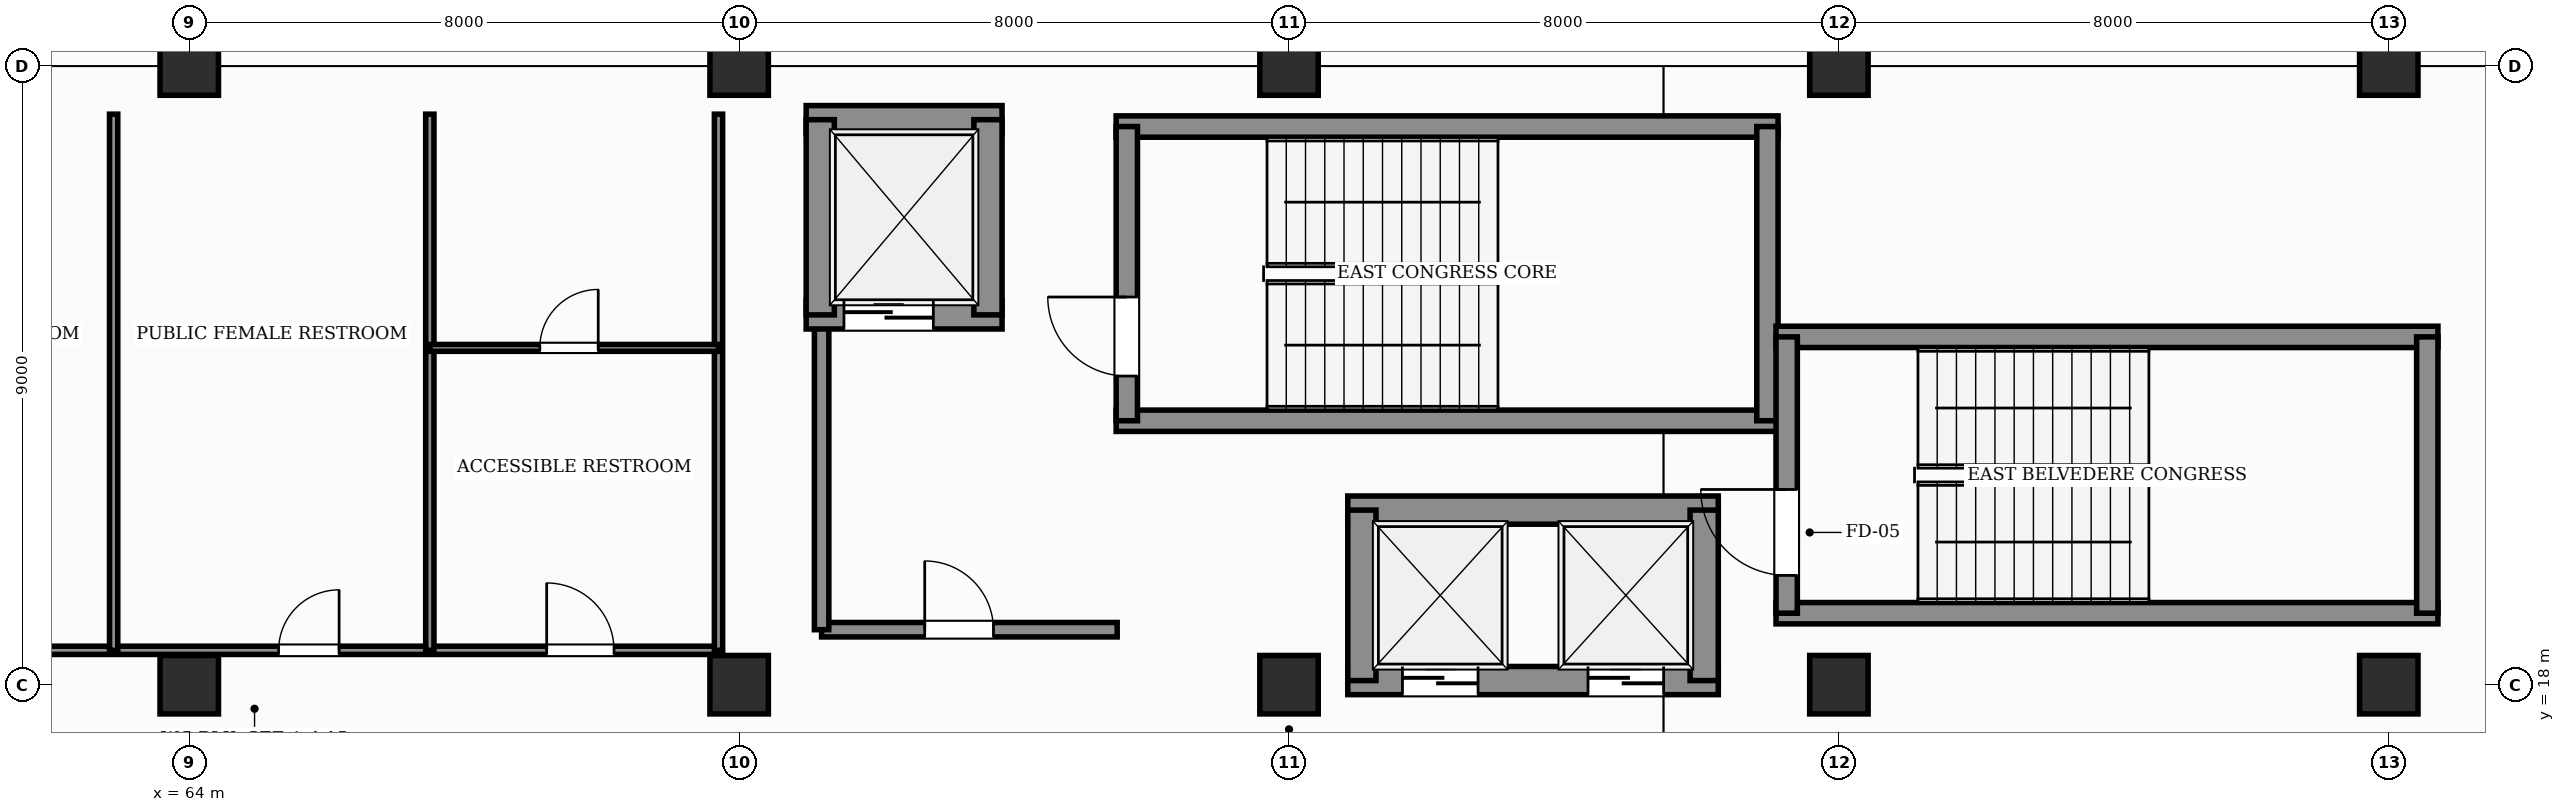
"""IFC4 building model, lengths in metres.
Left out: names, types, materials, properties, quantities, classifications, styles, units other than length and angle.
Written with IfcOpenShell. Run it as: python <this file> out.ifc"""

import sys

from ifc_helpers import new_model, si_unit, direction, frame, frame_2d, origin, origin_2d, place, context, subcontext, project, spatial, rectangle, extrude, element, fill, save


model = new_model("IFC4")
c1 = context("Model", 3, precision=1e-05, world=origin(), true_north=direction((0.0, 1.0)))
c2 = subcontext(c1, "Body", "Model", "MODEL_VIEW")
j1 = project(units=[si_unit("LENGTHUNIT", "METRE"), si_unit("PLANEANGLEUNIT", "RADIAN")], contexts=[c1])
p1 = place(None, origin())
s1 = spatial("IfcSite", under=j1, at=p1, CompositionType="ELEMENT")
p2 = place(p1, origin())
s2 = spatial("IfcBuilding", under=s1, at=p2, CompositionType="ELEMENT")
p3 = place(p2, frame((0.0, 0.0, -4.8)))
s3 = spatial("IfcBuildingStorey", under=s2, at=p3, CompositionType="ELEMENT", Elevation=-4.8)
for number, where, z_axis, x_axis in (
    (1, (64.0, 18.0, 0.0), (0.0, 0.0, 1.0), (1.0, 0.0, 0.0)),
    (2, (64.0, 27.0, 0.0), (0.0, 0.0, 1.0), (1.0, 0.0, 0.0)),
    (3, (72.0, 18.0, 0.0), (0.0, 0.0, 1.0), (1.0, 0.0, 0.0)),
    (4, (72.0, 27.0, 0.0), (0.0, 0.0, 1.0), (1.0, 0.0, 0.0)),
    (5, (80.0, 18.0, 0.0), (0.0, 0.0, 1.0), (1.0, 0.0, 0.0)),
    (6, (80.0, 27.0, 0.0), (0.0, 0.0, 1.0), (1.0, 0.0, 0.0)),
    (7, (88.0, 18.0, 0.0), (0.0, 0.0, 1.0), (1.0, 0.0, 0.0)),
    (8, (88.0, 27.0, 0.0), (0.0, 0.0, 1.0), (1.0, 0.0, 0.0)),
    (9, (96.0, 18.0, 0.0), (0.0, 0.0, 1.0), (1.0, 0.0, 0.0)),
    (10, (96.0, 27.0, 0.0), (0.0, 0.0, 1.0), (1.0, 0.0, 0.0)),
):
    element("IfcColumn", number, at=place(p3, frame(where, z_axis=z_axis, x_axis=x_axis)), inside=s3, PredefinedType="COLUMN", context=c2, shape_type="SweptSolid", body=[
        extrude(rectangle(XDim=0.85, YDim=0.85, at=origin_2d()), origin(), (0.0, 0.0, 1.0), 4.8),
    ])
for number, where, z_axis, x_axis in (
    (11, (77.485, 21.84, 0.0), (0.0, 0.0, 1.0), (1.0, 0.0, 0.0)),
    (12, (77.485, 26.12, 0.0), (0.0, 0.0, 1.0), (1.0, 0.0, 0.0)),
):
    element("IfcWall", number, at=place(p3, frame(where, z_axis=z_axis, x_axis=x_axis)), inside=s3, PredefinedType="SHEAR", context=c2, shape_type="SweptSolid", body=[
        extrude(rectangle(XDim=9.63, YDim=0.31, at=frame_2d((4.815, 0.0))), origin(), (0.0, 0.0, 1.0), 4.8),
    ])
p4 = place(p3, frame((77.64, 21.84, 0.0), z_axis=(0.0, 0.0, 1.0), x_axis=(0.0, 1.0, 0.0)))
e13 = element("IfcWall", 13, at=p4, inside=s3, PredefinedType="SHEAR", context=c2, shape_type="SweptSolid", body=[
    extrude(rectangle(XDim=4.28, YDim=0.31, at=frame_2d((2.14, 0.0))), origin(), (0.0, 0.0, 1.0), 4.8),
])
p5 = place(p4, frame((0.65, 0.0, 0.0)))
e14 = element("IfcOpeningElement", 14, at=p5, cuts=e13, PredefinedType="OPENING", context=c2, shape_type="SweptSolid", body=[
    extrude(rectangle(XDim=1.15, YDim=2.2, at=frame_2d((0.575, 1.1))), frame((0.0, 0.165, 0.0), z_axis=(0.0, -1.0, 0.0), x_axis=(1.0, 0.0, 0.0)), (0.0, 0.0, 1.0), 0.33),
])
p6 = place(p3, frame((86.96, 21.84, 0.0), z_axis=(0.0, 0.0, 1.0), x_axis=(0.0, 1.0, 0.0)))
e15 = element("IfcWall", 15, at=p6, inside=s3, PredefinedType="SHEAR", context=c2, shape_type="SweptSolid", body=[
    extrude(rectangle(XDim=4.28, YDim=0.31, at=frame_2d((2.14, 0.0))), origin(), (0.0, 0.0, 1.0), 4.8),
])
p7 = place(p3, frame((73.2, 18.8, 0.0), z_axis=(0.0, 0.0, 1.0), x_axis=(1.0, 0.0, 0.0)))
e16 = element("IfcWall", 16, at=p7, inside=s3, PredefinedType="PARTITIONING", context=c2, shape_type="SweptSolid", body=[
    extrude(rectangle(XDim=4.3, YDim=0.21, at=frame_2d((2.15, 0.0))), origin(), (0.0, 0.0, 1.0), 3.25),
])
p8 = place(p7, frame((1.5, 0.0, 0.0)))
e17 = element("IfcOpeningElement", 17, at=p8, cuts=e16, PredefinedType="OPENING", context=c2, shape_type="SweptSolid", body=[
    extrude(rectangle(XDim=1.0, YDim=2.15, at=frame_2d((0.5, 1.075))), frame((0.0, 0.115, 0.0), z_axis=(0.0, -1.0, 0.0), x_axis=(1.0, 0.0, 0.0)), (0.0, 0.0, 1.0), 0.23),
])
p9 = place(p3, frame((73.2, 18.8, 0.0), z_axis=(0.0, 0.0, 1.0), x_axis=(0.0, 1.0, 0.0)))
e18 = element("IfcWall", 18, at=p9, inside=s3, PredefinedType="PARTITIONING", context=c2, shape_type="SweptSolid", body=[
    extrude(rectangle(XDim=4.6, YDim=0.21, at=frame_2d((2.3, 0.0))), origin(), (0.0, 0.0, 1.0), 3.25),
])
p10 = place(p3, frame((72.975, 23.38, 0.0), z_axis=(0.0, 0.0, 1.0), x_axis=(1.0, 0.0, 0.0)))
e19 = element("IfcWall", 19, at=p10, inside=s3, PredefinedType="SHEAR", context=c2, shape_type="SweptSolid", body=[
    extrude(rectangle(XDim=2.85, YDim=0.41, at=frame_2d((1.425, 0.0))), origin(), (0.0, 0.0, 1.0), 4.8),
])
p11 = place(p10, frame((0.55, 0.0, 0.0)))
e20 = element("IfcOpeningElement", 20, at=p11, cuts=e19, PredefinedType="OPENING", context=c2, shape_type="SweptSolid", body=[
    extrude(rectangle(XDim=1.3, YDim=2.25, at=frame_2d((0.65, 1.125))), frame((0.0, 0.215, 0.0), z_axis=(0.0, -1.0, 0.0), x_axis=(1.0, 0.0, 0.0)), (0.0, 0.0, 1.0), 0.43),
])
p12 = place(p3, frame((72.975, 26.22, 0.0), z_axis=(0.0, 0.0, 1.0), x_axis=(1.0, 0.0, 0.0)))
e21 = element("IfcWall", 21, at=p12, inside=s3, PredefinedType="SHEAR", context=c2, shape_type="SweptSolid", body=[
    extrude(rectangle(XDim=2.85, YDim=0.41, at=frame_2d((1.425, 0.0))), origin(), (0.0, 0.0, 1.0), 4.8),
])
for number, where, z_axis, x_axis in (
    (22, (73.18, 23.38, 0.0), (0.0, 0.0, 1.0), (0.0, 1.0, 0.0)),
    (23, (75.62, 23.38, 0.0), (0.0, 0.0, 1.0), (0.0, 1.0, 0.0)),
):
    element("IfcWall", number, at=place(p3, frame(where, z_axis=z_axis, x_axis=x_axis)), inside=s3, PredefinedType="SHEAR", context=c2, shape_type="SweptSolid", body=[
        extrude(rectangle(XDim=2.84, YDim=0.41, at=frame_2d((1.42, 0.0))), origin(), (0.0, 0.0, 1.0), 4.8),
    ])
p13 = place(p3, frame((80.855, 18.06, 0.0), z_axis=(0.0, 0.0, 1.0), x_axis=(1.0, 0.0, 0.0)))
e24 = element("IfcWall", 24, at=p13, inside=s3, PredefinedType="SHEAR", context=c2, shape_type="SweptSolid", body=[
    extrude(rectangle(XDim=5.39, YDim=0.41, at=frame_2d((2.695, 0.0))), origin(), (0.0, 0.0, 1.0), 4.8),
])
p14 = place(p13, frame((0.795, 0.0, 0.0)))
e25 = element("IfcOpeningElement", 25, at=p14, cuts=e24, PredefinedType="OPENING", context=c2, shape_type="SweptSolid", body=[
    extrude(rectangle(XDim=1.1, YDim=2.2, at=frame_2d((0.55, 1.1))), frame((0.0, 0.215, 0.0), z_axis=(0.0, -1.0, 0.0), x_axis=(1.0, 0.0, 0.0)), (0.0, 0.0, 1.0), 0.43),
])
p15 = place(p13, frame((3.495, 0.0, 0.0)))
e26 = element("IfcOpeningElement", 26, at=p15, cuts=e24, PredefinedType="OPENING", context=c2, shape_type="SweptSolid", body=[
    extrude(rectangle(XDim=1.1, YDim=2.2, at=frame_2d((0.55, 1.1))), frame((0.0, 0.215, 0.0), z_axis=(0.0, -1.0, 0.0), x_axis=(1.0, 0.0, 0.0)), (0.0, 0.0, 1.0), 0.43),
])
p16 = place(p3, frame((80.855, 20.54, 0.0), z_axis=(0.0, 0.0, 1.0), x_axis=(1.0, 0.0, 0.0)))
e27 = element("IfcWall", 27, at=p16, inside=s3, PredefinedType="SHEAR", context=c2, shape_type="SweptSolid", body=[
    extrude(rectangle(XDim=5.39, YDim=0.41, at=frame_2d((2.695, 0.0))), origin(), (0.0, 0.0, 1.0), 4.8),
])
for number, where, z_axis, x_axis in (
    (28, (81.06, 18.06, 0.0), (0.0, 0.0, 1.0), (0.0, 1.0, 0.0)),
    (29, (86.04, 18.06, 0.0), (0.0, 0.0, 1.0), (0.0, 1.0, 0.0)),
):
    element("IfcWall", number, at=place(p3, frame(where, z_axis=z_axis, x_axis=x_axis)), inside=s3, PredefinedType="SHEAR", context=c2, shape_type="SweptSolid", body=[
        extrude(rectangle(XDim=2.48, YDim=0.41, at=frame_2d((1.24, 0.0))), origin(), (0.0, 0.0, 1.0), 4.8),
    ])
for number, where, z_axis, x_axis in (
    (30, (87.085, 19.04, 0.0), (0.0, 0.0, 1.0), (1.0, 0.0, 0.0)),
    (31, (87.085, 23.06, 0.0), (0.0, 0.0, 1.0), (1.0, 0.0, 0.0)),
):
    element("IfcWall", number, at=place(p3, frame(where, z_axis=z_axis, x_axis=x_axis)), inside=s3, PredefinedType="SHEAR", context=c2, shape_type="SweptSolid", body=[
        extrude(rectangle(XDim=9.63, YDim=0.31, at=frame_2d((4.815, 0.0))), origin(), (0.0, 0.0, 1.0), 4.8),
    ])
p17 = place(p3, frame((87.24, 19.04, 0.0), z_axis=(0.0, 0.0, 1.0), x_axis=(0.0, 1.0, 0.0)))
e32 = element("IfcWall", 32, at=p17, inside=s3, PredefinedType="SHEAR", context=c2, shape_type="SweptSolid", body=[
    extrude(rectangle(XDim=4.02, YDim=0.31, at=frame_2d((2.01, 0.0))), origin(), (0.0, 0.0, 1.0), 4.8),
])
p18 = place(p17, frame((0.55, 0.0, 0.0)))
e33 = element("IfcOpeningElement", 33, at=p18, cuts=e32, PredefinedType="OPENING", context=c2, shape_type="SweptSolid", body=[
    extrude(rectangle(XDim=1.25, YDim=2.2, at=frame_2d((0.625, 1.1))), frame((0.0, 0.165, 0.0), z_axis=(0.0, -1.0, 0.0), x_axis=(1.0, 0.0, 0.0)), (0.0, 0.0, 1.0), 0.33),
])
p19 = place(p3, frame((96.56, 19.04, 0.0), z_axis=(0.0, 0.0, 1.0), x_axis=(0.0, 1.0, 0.0)))
e34 = element("IfcWall", 34, at=p19, inside=s3, PredefinedType="SHEAR", context=c2, shape_type="SweptSolid", body=[
    extrude(rectangle(XDim=4.02, YDim=0.31, at=frame_2d((2.01, 0.0))), origin(), (0.0, 0.0, 1.0), 4.8),
])
p20 = place(p3, frame((58.3, 18.5, 0.0), z_axis=(0.0, 0.0, 1.0), x_axis=(1.0, 0.0, 0.0)))
e35 = element("IfcWall", 35, at=p20, inside=s3, PredefinedType="PARTITIONING", context=c2, shape_type="SweptSolid", body=[
    extrude(rectangle(XDim=13.4, YDim=0.12, at=frame_2d((6.7, 0.0))), origin(), (0.0, 0.0, 1.0), 3.25),
])
p21 = place(p20, frame((1.8, 0.0, 0.0)))
e36 = element("IfcOpeningElement", 36, at=p21, cuts=e35, PredefinedType="OPENING", context=c2, shape_type="SweptSolid", body=[
    extrude(rectangle(XDim=0.88, YDim=2.1, at=frame_2d((0.44, 1.05))), frame((0.0, 0.07, 0.0), z_axis=(0.0, -1.0, 0.0), x_axis=(1.0, 0.0, 0.0)), (0.0, 0.0, 1.0), 0.14),
])
p22 = place(p20, frame((7.0, 0.0, 0.0)))
e37 = element("IfcOpeningElement", 37, at=p22, cuts=e35, PredefinedType="OPENING", context=c2, shape_type="SweptSolid", body=[
    extrude(rectangle(XDim=0.88, YDim=2.1, at=frame_2d((0.44, 1.05))), frame((0.0, 0.07, 0.0), z_axis=(0.0, -1.0, 0.0), x_axis=(1.0, 0.0, 0.0)), (0.0, 0.0, 1.0), 0.14),
])
p23 = place(p20, frame((10.9, 0.0, 0.0)))
e38 = element("IfcOpeningElement", 38, at=p23, cuts=e35, PredefinedType="OPENING", context=c2, shape_type="SweptSolid", body=[
    extrude(rectangle(XDim=0.98, YDim=2.15, at=frame_2d((0.49, 1.075))), frame((0.0, 0.07, 0.0), z_axis=(0.0, -1.0, 0.0), x_axis=(1.0, 0.0, 0.0)), (0.0, 0.0, 1.0), 0.14),
])
for number, where, z_axis, x_axis in (
    (39, (62.9, 18.5, 0.0), (0.0, 0.0, 1.0), (0.0, 1.0, 0.0)),
    (40, (67.5, 18.5, 0.0), (0.0, 0.0, 1.0), (0.0, 1.0, 0.0)),
    (41, (71.7, 18.5, 0.0), (0.0, 0.0, 1.0), (0.0, 1.0, 0.0)),
):
    element("IfcWall", number, at=place(p3, frame(where, z_axis=z_axis, x_axis=x_axis)), inside=s3, PredefinedType="PARTITIONING", context=c2, shape_type="SweptSolid", body=[
        extrude(rectangle(XDim=7.8, YDim=0.12, at=frame_2d((3.9, 0.0))), origin(), (0.0, 0.0, 1.0), 3.25),
    ])
p24 = place(p3, frame((67.5, 22.9, 0.0), z_axis=(0.0, 0.0, 1.0), x_axis=(1.0, 0.0, 0.0)))
e42 = element("IfcWall", 42, at=p24, inside=s3, PredefinedType="PARTITIONING", context=c2, shape_type="SweptSolid", body=[
    extrude(rectangle(XDim=4.2, YDim=0.1, at=frame_2d((2.1, 0.0))), origin(), (0.0, 0.0, 1.0), 3.25),
])
p25 = place(p24, frame((1.6, 0.0, 0.0)))
e43 = element("IfcOpeningElement", 43, at=p25, cuts=e42, PredefinedType="OPENING", context=c2, shape_type="SweptSolid", body=[
    extrude(rectangle(XDim=0.85, YDim=2.1, at=frame_2d((0.425, 1.05))), frame((0.0, 0.06, 0.0), z_axis=(0.0, -1.0, 0.0), x_axis=(1.0, 0.0, 0.0)), (0.0, 0.0, 1.0), 0.12),
])
p26 = place(p5, origin())
e44 = element("IfcDoor", 44, at=p26, inside=s3, OperationType="SINGLE_SWING_RIGHT", PredefinedType="DOOR", context=c2, shape_type="SweptSolid", body=[
    extrude(rectangle(XDim=1.15, YDim=2.2, at=frame_2d((0.575, 1.1))), frame((0.0, 0.025, 0.0), z_axis=(0.0, -1.0, 0.0), x_axis=(1.0, 0.0, 0.0)), (0.0, 0.0, 1.0), 0.05),
])
fill(e14, e44)
p27 = place(p8, origin())
e45 = element("IfcDoor", 45, at=p27, inside=s3, OperationType="SINGLE_SWING_LEFT", PredefinedType="DOOR", context=c2, shape_type="SweptSolid", body=[
    extrude(rectangle(XDim=1.0, YDim=2.15, at=frame_2d((0.5, 1.075))), frame((0.0, 0.025, 0.0), z_axis=(0.0, -1.0, 0.0), x_axis=(1.0, 0.0, 0.0)), (0.0, 0.0, 1.0), 0.05),
])
fill(e17, e45)
p28 = place(p11, origin())
e46 = element("IfcDoor", 46, at=p28, inside=s3, OperationType="DOUBLE_DOOR_SLIDING", PredefinedType="DOOR", context=c2, shape_type="SweptSolid", body=[
    extrude(rectangle(XDim=1.3, YDim=2.25, at=frame_2d((0.65, 1.125))), frame((0.0, 0.025, 0.0), z_axis=(0.0, -1.0, 0.0), x_axis=(1.0, 0.0, 0.0)), (0.0, 0.0, 1.0), 0.05),
])
fill(e20, e46)
p29 = place(p14, origin())
e47 = element("IfcDoor", 47, at=p29, inside=s3, OperationType="DOUBLE_DOOR_SLIDING", PredefinedType="DOOR", context=c2, shape_type="SweptSolid", body=[
    extrude(rectangle(XDim=1.1, YDim=2.2, at=frame_2d((0.55, 1.1))), frame((0.0, 0.025, 0.0), z_axis=(0.0, -1.0, 0.0), x_axis=(1.0, 0.0, 0.0)), (0.0, 0.0, 1.0), 0.05),
])
fill(e25, e47)
p30 = place(p15, origin())
e48 = element("IfcDoor", 48, at=p30, inside=s3, OperationType="DOUBLE_DOOR_SLIDING", PredefinedType="DOOR", context=c2, shape_type="SweptSolid", body=[
    extrude(rectangle(XDim=1.1, YDim=2.2, at=frame_2d((0.55, 1.1))), frame((0.0, 0.025, 0.0), z_axis=(0.0, -1.0, 0.0), x_axis=(1.0, 0.0, 0.0)), (0.0, 0.0, 1.0), 0.05),
])
fill(e26, e48)
p31 = place(p18, origin())
e49 = element("IfcDoor", 49, at=p31, inside=s3, OperationType="SINGLE_SWING_RIGHT", PredefinedType="DOOR", context=c2, shape_type="SweptSolid", body=[
    extrude(rectangle(XDim=1.25, YDim=2.2, at=frame_2d((0.625, 1.1))), frame((0.0, 0.025, 0.0), z_axis=(0.0, -1.0, 0.0), x_axis=(1.0, 0.0, 0.0)), (0.0, 0.0, 1.0), 0.05),
])
fill(e33, e49)
p32 = place(p22, origin())
e50 = element("IfcDoor", 50, at=p32, inside=s3, OperationType="SINGLE_SWING_RIGHT", PredefinedType="DOOR", context=c2, shape_type="SweptSolid", body=[
    extrude(rectangle(XDim=0.88, YDim=2.1, at=frame_2d((0.44, 1.05))), frame((0.0, 0.025, 0.0), z_axis=(0.0, -1.0, 0.0), x_axis=(1.0, 0.0, 0.0)), (0.0, 0.0, 1.0), 0.05),
])
fill(e37, e50)
p33 = place(p23, origin())
e51 = element("IfcDoor", 51, at=p33, inside=s3, OperationType="SINGLE_SWING_LEFT", PredefinedType="DOOR", context=c2, shape_type="SweptSolid", body=[
    extrude(rectangle(XDim=0.98, YDim=2.15, at=frame_2d((0.49, 1.075))), frame((0.0, 0.025, 0.0), z_axis=(0.0, -1.0, 0.0), x_axis=(1.0, 0.0, 0.0)), (0.0, 0.0, 1.0), 0.05),
])
fill(e38, e51)
p34 = place(p25, origin())
e52 = element("IfcDoor", 52, at=p34, inside=s3, OperationType="SINGLE_SWING_RIGHT", PredefinedType="DOOR", context=c2, shape_type="SweptSolid", body=[
    extrude(rectangle(XDim=0.85, YDim=2.1, at=frame_2d((0.425, 1.05))), frame((0.0, 0.025, 0.0), z_axis=(0.0, -1.0, 0.0), x_axis=(1.0, 0.0, 0.0)), (0.0, 0.0, 1.0), 0.05),
])
fill(e43, e52)
save(model, sys.argv[1])
